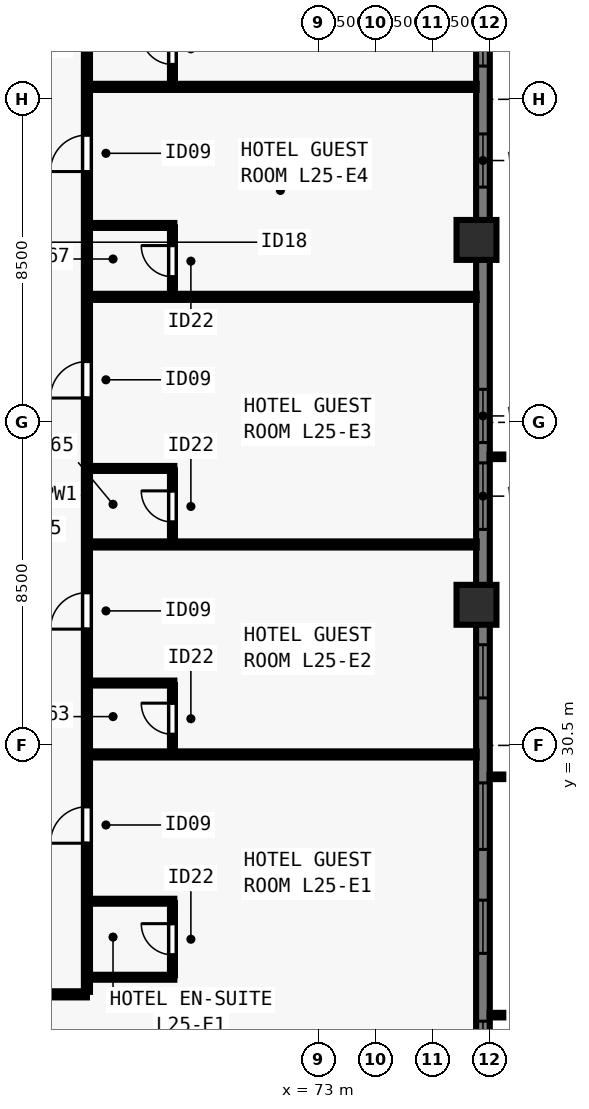
"""IFC4 building model, lengths in metres.
Left out: names, types, materials, properties, quantities, classifications, styles, units other than length and angle.
Written with IfcOpenShell. Run it as: python <this file> out.ifc"""

import sys

from ifc_helpers import new_model, si_unit, direction, frame, frame_2d, origin, origin_2d, place, context, subcontext, project, spatial, rectangle, extrude, element, fill, save


model = new_model("IFC4")
c1 = context("Model", 3, precision=1e-05, world=origin(), true_north=direction((0.0, 1.0)))
c2 = subcontext(c1, "Body", "Model", "MODEL_VIEW")
j1 = project(units=[si_unit("LENGTHUNIT", "METRE"), si_unit("PLANEANGLEUNIT", "RADIAN")], contexts=[c1])
p1 = place(None, origin())
s1 = spatial("IfcSite", under=j1, at=p1, CompositionType="ELEMENT")
p2 = place(p1, origin())
s2 = spatial("IfcBuilding", under=s1, at=p2, CompositionType="ELEMENT")
p3 = place(p2, frame((0.0, 0.0, 93.5)))
s3 = spatial("IfcBuildingStorey", under=s2, at=p3, CompositionType="ELEMENT", Elevation=93.5)
for number, where, z_axis, x_axis in (
    (1, (77.15, 34.2, 0.0), (0.0, 0.0, 1.0), (0.0, 1.0, 0.0)),
    (2, (77.15, 43.8, 0.0), (0.0, 0.0, 1.0), (0.0, 1.0, 0.0)),
):
    element("IfcColumn", number, at=place(p3, frame(where, z_axis=z_axis, x_axis=x_axis)), inside=s3, PredefinedType="COLUMN", context=c2, shape_type="SweptSolid", body=[
        extrude(rectangle(XDim=1.05, YDim=1.05, at=origin_2d()), origin(), (0.0, 0.0, 1.0), 3.5),
    ])
p4 = place(p3, frame((77.32, 61.5, 0.0), z_axis=(0.0, 0.0, 1.0), x_axis=(0.0, -1.0, 0.0)))
e3 = element("IfcWall", 3, at=p4, inside=s3, PredefinedType="SOLIDWALL", context=c2, shape_type="SweptSolid", body=[
    extrude(rectangle(XDim=44.662, YDim=0.36, at=frame_2d((22.331, 0.0))), origin(), (0.0, 0.0, 1.0), 3.24),
])
p5 = place(p4, frame((8.19, 0.0, 0.8)))
e4 = element("IfcOpeningElement", 4, at=p5, cuts=e3, PredefinedType="OPENING", context=c2, shape_type="SweptSolid", body=[
    extrude(rectangle(XDim=1.4, YDim=1.504, at=frame_2d((0.7, 0.752))), frame((0.0, 0.19, 0.0), z_axis=(0.0, -1.0, 0.0), x_axis=(1.0, 0.0, 0.0)), (0.0, 0.0, 1.0), 0.38),
])
p6 = place(p4, frame((11.375, 0.0, 0.8)))
e5 = element("IfcOpeningElement", 5, at=p6, cuts=e3, PredefinedType="OPENING", context=c2, shape_type="SweptSolid", body=[
    extrude(rectangle(XDim=1.75, YDim=1.504, at=frame_2d((0.875, 0.752))), frame((0.0, 0.19, 0.0), z_axis=(0.0, -1.0, 0.0), x_axis=(1.0, 0.0, 0.0)), (0.0, 0.0, 1.0), 0.38),
])
p7 = place(p4, frame((14.911, 0.0, 0.8)))
e6 = element("IfcOpeningElement", 6, at=p7, cuts=e3, PredefinedType="OPENING", context=c2, shape_type="SweptSolid", body=[
    extrude(rectangle(XDim=1.4, YDim=1.504, at=frame_2d((0.7, 0.752))), frame((0.0, 0.19, 0.0), z_axis=(0.0, -1.0, 0.0), x_axis=(1.0, 0.0, 0.0)), (0.0, 0.0, 1.0), 0.38),
])
p8 = place(p4, frame((21.631, 0.0, 0.8)))
e7 = element("IfcOpeningElement", 7, at=p8, cuts=e3, PredefinedType="OPENING", context=c2, shape_type="SweptSolid", body=[
    extrude(rectangle(XDim=1.4, YDim=1.504, at=frame_2d((0.7, 0.752))), frame((0.0, 0.19, 0.0), z_axis=(0.0, -1.0, 0.0), x_axis=(1.0, 0.0, 0.0)), (0.0, 0.0, 1.0), 0.38),
])
p9 = place(p4, frame((23.566, 0.0, 0.8)))
e8 = element("IfcOpeningElement", 8, at=p9, cuts=e3, PredefinedType="OPENING", context=c2, shape_type="SweptSolid", body=[
    extrude(rectangle(XDim=1.75, YDim=1.504, at=frame_2d((0.875, 0.752))), frame((0.0, 0.19, 0.0), z_axis=(0.0, -1.0, 0.0), x_axis=(1.0, 0.0, 0.0)), (0.0, 0.0, 1.0), 0.38),
])
p10 = place(p4, frame((28.351, 0.0, 0.8)))
e9 = element("IfcOpeningElement", 9, at=p10, cuts=e3, PredefinedType="OPENING", context=c2, shape_type="SweptSolid", body=[
    extrude(rectangle(XDim=1.4, YDim=1.504, at=frame_2d((0.7, 0.752))), frame((0.0, 0.19, 0.0), z_axis=(0.0, -1.0, 0.0), x_axis=(1.0, 0.0, 0.0)), (0.0, 0.0, 1.0), 0.38),
])
p11 = place(p4, frame((31.987, 0.0, 0.8)))
e10 = element("IfcOpeningElement", 10, at=p11, cuts=e3, PredefinedType="OPENING", context=c2, shape_type="SweptSolid", body=[
    extrude(rectangle(XDim=1.75, YDim=1.504, at=frame_2d((0.875, 0.752))), frame((0.0, 0.19, 0.0), z_axis=(0.0, -1.0, 0.0), x_axis=(1.0, 0.0, 0.0)), (0.0, 0.0, 1.0), 0.38),
])
p12 = place(p4, frame((35.072, 0.0, 0.8)))
e11 = element("IfcOpeningElement", 11, at=p12, cuts=e3, PredefinedType="OPENING", context=c2, shape_type="SweptSolid", body=[
    extrude(rectangle(XDim=1.4, YDim=1.504, at=frame_2d((0.7, 0.752))), frame((0.0, 0.19, 0.0), z_axis=(0.0, -1.0, 0.0), x_axis=(1.0, 0.0, 0.0)), (0.0, 0.0, 1.0), 0.38),
])
p13 = place(p4, frame((38.257, 0.0, 0.8)))
e12 = element("IfcOpeningElement", 12, at=p13, cuts=e3, PredefinedType="OPENING", context=c2, shape_type="SweptSolid", body=[
    extrude(rectangle(XDim=1.75, YDim=1.504, at=frame_2d((0.875, 0.752))), frame((0.0, 0.19, 0.0), z_axis=(0.0, -1.0, 0.0), x_axis=(1.0, 0.0, 0.0)), (0.0, 0.0, 1.0), 0.38),
])
p14 = place(p3, frame((37.1, 23.95, 0.0), z_axis=(0.0, 0.0, 1.0), x_axis=(1.0, 0.0, 0.0)))
e13 = element("IfcWall", 13, at=p14, inside=s3, PredefinedType="PARTITIONING", context=c2, shape_type="SweptSolid", body=[
    extrude(rectangle(XDim=29.8, YDim=0.16, at=frame_2d((14.9, 0.0))), origin(), (0.0, 0.0, 1.0), 3.24),
])
p15 = place(p14, frame((2.571, 0.0, 0.0)))
e14 = element("IfcOpeningElement", 14, at=p15, cuts=e13, PredefinedType="OPENING", context=c2, shape_type="SweptSolid", body=[
    extrude(rectangle(XDim=0.96, YDim=2.15, at=frame_2d((0.48, 1.075))), frame((0.0, 0.09, 0.0), z_axis=(0.0, -1.0, 0.0), x_axis=(1.0, 0.0, 0.0)), (0.0, 0.0, 1.0), 0.18),
])
p16 = place(p14, frame((15.42, 0.0, 0.0)))
e15 = element("IfcOpeningElement", 15, at=p16, cuts=e13, PredefinedType="OPENING", context=c2, shape_type="SweptSolid", body=[
    extrude(rectangle(XDim=0.96, YDim=2.15, at=frame_2d((0.48, 1.075))), frame((0.0, 0.09, 0.0), z_axis=(0.0, -1.0, 0.0), x_axis=(1.0, 0.0, 0.0)), (0.0, 0.0, 1.0), 0.18),
])
p17 = place(p14, frame((27.269, 0.0, 0.0)))
e16 = element("IfcOpeningElement", 16, at=p17, cuts=e13, PredefinedType="OPENING", context=c2, shape_type="SweptSolid", body=[
    extrude(rectangle(XDim=0.96, YDim=2.15, at=frame_2d((0.48, 1.075))), frame((0.0, 0.09, 0.0), z_axis=(0.0, -1.0, 0.0), x_axis=(1.0, 0.0, 0.0)), (0.0, 0.0, 1.0), 0.18),
])
p18 = place(p3, frame((66.9, 24.015, 0.0), z_axis=(0.0, 0.0, 1.0), x_axis=(0.0, 1.0, 0.0)))
e17 = element("IfcWall", 17, at=p18, inside=s3, PredefinedType="PARTITIONING", context=c2, shape_type="SweptSolid", body=[
    extrude(rectangle(XDim=29.97, YDim=0.16, at=frame_2d((14.985, 0.0))), origin(), (0.0, 0.0, 1.0), 3.24),
])
p19 = place(p18, frame((3.911, 0.0, 0.0)))
e18 = element("IfcOpeningElement", 18, at=p19, cuts=e17, PredefinedType="OPENING", context=c2, shape_type="SweptSolid", body=[
    extrude(rectangle(XDim=0.96, YDim=2.15, at=frame_2d((0.48, 1.075))), frame((0.0, 0.09, 0.0), z_axis=(0.0, -1.0, 0.0), x_axis=(1.0, 0.0, 0.0)), (0.0, 0.0, 1.0), 0.18),
])
p20 = place(p18, frame((9.544, 0.0, 0.0)))
e19 = element("IfcOpeningElement", 19, at=p20, cuts=e17, PredefinedType="OPENING", context=c2, shape_type="SweptSolid", body=[
    extrude(rectangle(XDim=0.96, YDim=2.15, at=frame_2d((0.48, 1.075))), frame((0.0, 0.09, 0.0), z_axis=(0.0, -1.0, 0.0), x_axis=(1.0, 0.0, 0.0)), (0.0, 0.0, 1.0), 0.18),
])
p21 = place(p18, frame((15.625, 0.0, 0.0)))
e20 = element("IfcOpeningElement", 20, at=p21, cuts=e17, PredefinedType="OPENING", context=c2, shape_type="SweptSolid", body=[
    extrude(rectangle(XDim=0.96, YDim=2.15, at=frame_2d((0.48, 1.075))), frame((0.0, 0.09, 0.0), z_axis=(0.0, -1.0, 0.0), x_axis=(1.0, 0.0, 0.0)), (0.0, 0.0, 1.0), 0.18),
])
p22 = place(p18, frame((21.584, 0.0, 0.0)))
e21 = element("IfcOpeningElement", 21, at=p22, cuts=e17, PredefinedType="OPENING", context=c2, shape_type="SweptSolid", body=[
    extrude(rectangle(XDim=0.96, YDim=2.15, at=frame_2d((0.48, 1.075))), frame((0.0, 0.09, 0.0), z_axis=(0.0, -1.0, 0.0), x_axis=(1.0, 0.0, 0.0)), (0.0, 0.0, 1.0), 0.18),
])
p23 = place(p18, frame((27.494, 0.0, 0.0)))
e22 = element("IfcOpeningElement", 22, at=p23, cuts=e17, PredefinedType="OPENING", context=c2, shape_type="SweptSolid", body=[
    extrude(rectangle(XDim=0.96, YDim=2.15, at=frame_2d((0.48, 1.075))), frame((0.0, 0.09, 0.0), z_axis=(0.0, -1.0, 0.0), x_axis=(1.0, 0.0, 0.0)), (0.0, 0.0, 1.0), 0.18),
])
p24 = place(p3, frame((66.965, 24.4, 0.0), z_axis=(0.0, 0.0, 1.0), x_axis=(1.0, 0.0, 0.0)))
e23 = element("IfcWall", 23, at=p24, inside=s3, PredefinedType="PLUMBINGWALL", context=c2, shape_type="SweptSolid", body=[
    extrude(rectangle(XDim=2.235, YDim=0.13, at=frame_2d((1.117, 0.0))), origin(), (0.0, 0.0, 1.0), 2.809),
])
p25 = place(p3, frame((66.965, 26.4, 0.0), z_axis=(0.0, 0.0, 1.0), x_axis=(1.0, 0.0, 0.0)))
e24 = element("IfcWall", 24, at=p25, inside=s3, PredefinedType="PLUMBINGWALL", context=c2, shape_type="SweptSolid", body=[
    extrude(rectangle(XDim=2.235, YDim=0.13, at=frame_2d((1.117, 0.0))), origin(), (0.0, 0.0, 1.0), 3.24),
])
p26 = place(p3, frame((69.15, 24.45, 0.0), z_axis=(0.0, 0.0, 1.0), x_axis=(0.0, 1.0, 0.0)))
e25 = element("IfcWall", 25, at=p26, inside=s3, PredefinedType="PLUMBINGWALL", context=c2, shape_type="SweptSolid", body=[
    extrude(rectangle(XDim=1.9, YDim=0.13, at=frame_2d((0.95, 0.0))), origin(), (0.0, 0.0, 1.0), 3.24),
])
p27 = place(p26, frame((0.54, 0.0, 0.0)))
e26 = element("IfcOpeningElement", 26, at=p27, cuts=e25, PredefinedType="OPENING", context=c2, shape_type="SweptSolid", body=[
    extrude(rectangle(XDim=0.82, YDim=2.1, at=frame_2d((0.41, 1.05))), frame((0.0, 0.075, 0.0), z_axis=(0.0, -1.0, 0.0), x_axis=(1.0, 0.0, 0.0)), (0.0, 0.0, 1.0), 0.15),
])
p28 = place(p3, frame((66.965, 30.262, 0.0), z_axis=(0.0, 0.0, 1.0), x_axis=(1.0, 0.0, 0.0)))
e27 = element("IfcWall", 27, at=p28, inside=s3, PredefinedType="PARTITIONING", context=c2, shape_type="SweptSolid", body=[
    extrude(rectangle(XDim=10.19, YDim=0.16, at=frame_2d((5.095, 0.0))), origin(), (0.0, 0.0, 1.0), 3.24),
])
p29 = place(p3, frame((66.965, 32.141, 0.0), z_axis=(0.0, 0.0, 1.0), x_axis=(1.0, 0.0, 0.0)))
e28 = element("IfcWall", 28, at=p29, inside=s3, PredefinedType="PLUMBINGWALL", context=c2, shape_type="SweptSolid", body=[
    extrude(rectangle(XDim=2.235, YDim=0.13, at=frame_2d((1.117, 0.0))), origin(), (0.0, 0.0, 1.0), 2.399),
])
p30 = place(p3, frame((69.15, 30.327, 0.0), z_axis=(0.0, 0.0, 1.0), x_axis=(0.0, 1.0, 0.0)))
e29 = element("IfcWall", 29, at=p30, inside=s3, PredefinedType="PLUMBINGWALL", context=c2, shape_type="SweptSolid", body=[
    extrude(rectangle(XDim=1.764, YDim=0.13, at=frame_2d((0.882, 0.0))), origin(), (0.0, 0.0, 1.0), 3.24),
])
p31 = place(p30, frame((0.464, 0.0, 0.0)))
e30 = element("IfcOpeningElement", 30, at=p31, cuts=e29, PredefinedType="OPENING", context=c2, shape_type="SweptSolid", body=[
    extrude(rectangle(XDim=0.82, YDim=2.1, at=frame_2d((0.41, 1.05))), frame((0.0, 0.075, 0.0), z_axis=(0.0, -1.0, 0.0), x_axis=(1.0, 0.0, 0.0)), (0.0, 0.0, 1.0), 0.15),
])
p32 = place(p3, frame((66.965, 35.788, 0.0), z_axis=(0.0, 0.0, 1.0), x_axis=(1.0, 0.0, 0.0)))
e31 = element("IfcWall", 31, at=p32, inside=s3, PredefinedType="PARTITIONING", context=c2, shape_type="SweptSolid", body=[
    extrude(rectangle(XDim=10.19, YDim=0.16, at=frame_2d((5.095, 0.0))), origin(), (0.0, 0.0, 1.0), 3.24),
])
p33 = place(p3, frame((66.965, 37.788, 0.0), z_axis=(0.0, 0.0, 1.0), x_axis=(1.0, 0.0, 0.0)))
e32 = element("IfcWall", 32, at=p33, inside=s3, PredefinedType="PLUMBINGWALL", context=c2, shape_type="SweptSolid", body=[
    extrude(rectangle(XDim=2.235, YDim=0.13, at=frame_2d((1.117, 0.0))), origin(), (0.0, 0.0, 1.0), 3.24),
])
p34 = place(p3, frame((69.15, 35.853, 0.0), z_axis=(0.0, 0.0, 1.0), x_axis=(0.0, 1.0, 0.0)))
e33 = element("IfcWall", 33, at=p34, inside=s3, PredefinedType="PLUMBINGWALL", context=c2, shape_type="SweptSolid", body=[
    extrude(rectangle(XDim=1.885, YDim=0.13, at=frame_2d((0.942, 0.0))), origin(), (0.0, 0.0, 1.0), 3.24),
])
p35 = place(p34, frame((0.525, 0.0, 0.0)))
e34 = element("IfcOpeningElement", 34, at=p35, cuts=e33, PredefinedType="OPENING", context=c2, shape_type="SweptSolid", body=[
    extrude(rectangle(XDim=0.82, YDim=2.1, at=frame_2d((0.41, 1.05))), frame((0.0, 0.075, 0.0), z_axis=(0.0, -1.0, 0.0), x_axis=(1.0, 0.0, 0.0)), (0.0, 0.0, 1.0), 0.15),
])
p36 = place(p3, frame((66.965, 42.302, 0.0), z_axis=(0.0, 0.0, 1.0), x_axis=(1.0, 0.0, 0.0)))
e35 = element("IfcWall", 35, at=p36, inside=s3, PredefinedType="PARTITIONING", context=c2, shape_type="SweptSolid", body=[
    extrude(rectangle(XDim=10.19, YDim=0.16, at=frame_2d((5.095, 0.0))), origin(), (0.0, 0.0, 1.0), 3.24),
])
p37 = place(p3, frame((66.965, 44.181, 0.0), z_axis=(0.0, 0.0, 1.0), x_axis=(1.0, 0.0, 0.0)))
e36 = element("IfcWall", 36, at=p37, inside=s3, PredefinedType="PLUMBINGWALL", context=c2, shape_type="SweptSolid", body=[
    extrude(rectangle(XDim=2.235, YDim=0.13, at=frame_2d((1.117, 0.0))), origin(), (0.0, 0.0, 1.0), 3.24),
])
p38 = place(p3, frame((69.15, 42.367, 0.0), z_axis=(0.0, 0.0, 1.0), x_axis=(0.0, 1.0, 0.0)))
e37 = element("IfcWall", 37, at=p38, inside=s3, PredefinedType="PLUMBINGWALL", context=c2, shape_type="SweptSolid", body=[
    extrude(rectangle(XDim=1.764, YDim=0.13, at=frame_2d((0.882, 0.0))), origin(), (0.0, 0.0, 1.0), 3.24),
])
p39 = place(p38, frame((0.464, 0.0, 0.0)))
e38 = element("IfcOpeningElement", 38, at=p39, cuts=e37, PredefinedType="OPENING", context=c2, shape_type="SweptSolid", body=[
    extrude(rectangle(XDim=0.82, YDim=2.1, at=frame_2d((0.41, 1.05))), frame((0.0, 0.075, 0.0), z_axis=(0.0, -1.0, 0.0), x_axis=(1.0, 0.0, 0.0)), (0.0, 0.0, 1.0), 0.15),
])
p40 = place(p3, frame((66.965, 47.827, 0.0), z_axis=(0.0, 0.0, 1.0), x_axis=(1.0, 0.0, 0.0)))
e39 = element("IfcWall", 39, at=p40, inside=s3, PredefinedType="PARTITIONING", context=c2, shape_type="SweptSolid", body=[
    extrude(rectangle(XDim=10.19, YDim=0.16, at=frame_2d((5.095, 0.0))), origin(), (0.0, 0.0, 1.0), 3.24),
])
p41 = place(p3, frame((69.15, 47.893, 0.0), z_axis=(0.0, 0.0, 1.0), x_axis=(0.0, 1.0, 0.0)))
e40 = element("IfcWall", 40, at=p41, inside=s3, PredefinedType="PLUMBINGWALL", context=c2, shape_type="SweptSolid", body=[
    extrude(rectangle(XDim=1.885, YDim=0.13, at=frame_2d((0.942, 0.0))), origin(), (0.0, 0.0, 1.0), 3.24),
])
p42 = place(p41, frame((0.525, 0.0, 0.0)))
e41 = element("IfcOpeningElement", 41, at=p42, cuts=e40, PredefinedType="OPENING", context=c2, shape_type="SweptSolid", body=[
    extrude(rectangle(XDim=0.82, YDim=2.1, at=frame_2d((0.41, 1.05))), frame((0.0, 0.075, 0.0), z_axis=(0.0, -1.0, 0.0), x_axis=(1.0, 0.0, 0.0)), (0.0, 0.0, 1.0), 0.15),
])
p43 = place(p6, origin())
e42 = element("IfcWindow", 42, at=p43, inside=s3, PartitioningType="SINGLE_PANEL", PredefinedType="WINDOW", context=c2, shape_type="SweptSolid", body=[
    extrude(rectangle(XDim=1.75, YDim=1.504, at=frame_2d((0.875, 0.752))), frame((0.0, -0.05, 0.0), z_axis=(0.0, -1.0, 0.0), x_axis=(1.0, 0.0, 0.0)), (0.0, 0.0, 1.0), 0.06),
])
fill(e5, e42)
p44 = place(p7, origin())
e43 = element("IfcWindow", 43, at=p44, inside=s3, PartitioningType="SINGLE_PANEL", PredefinedType="WINDOW", context=c2, shape_type="SweptSolid", body=[
    extrude(rectangle(XDim=1.4, YDim=1.504, at=frame_2d((0.7, 0.752))), frame((0.0, -0.05, 0.0), z_axis=(0.0, -1.0, 0.0), x_axis=(1.0, 0.0, 0.0)), (0.0, 0.0, 1.0), 0.06),
])
fill(e6, e43)
p45 = place(p8, origin())
e44 = element("IfcWindow", 44, at=p45, inside=s3, PartitioningType="SINGLE_PANEL", PredefinedType="WINDOW", context=c2, shape_type="SweptSolid", body=[
    extrude(rectangle(XDim=1.4, YDim=1.504, at=frame_2d((0.7, 0.752))), frame((0.0, -0.05, 0.0), z_axis=(0.0, -1.0, 0.0), x_axis=(1.0, 0.0, 0.0)), (0.0, 0.0, 1.0), 0.06),
])
fill(e7, e44)
p46 = place(p9, origin())
e45 = element("IfcWindow", 45, at=p46, inside=s3, PartitioningType="SINGLE_PANEL", PredefinedType="WINDOW", context=c2, shape_type="SweptSolid", body=[
    extrude(rectangle(XDim=1.75, YDim=1.504, at=frame_2d((0.875, 0.752))), frame((0.0, -0.05, 0.0), z_axis=(0.0, -1.0, 0.0), x_axis=(1.0, 0.0, 0.0)), (0.0, 0.0, 1.0), 0.06),
])
fill(e8, e45)
p47 = place(p10, origin())
e46 = element("IfcWindow", 46, at=p47, inside=s3, PartitioningType="SINGLE_PANEL", PredefinedType="WINDOW", context=c2, shape_type="SweptSolid", body=[
    extrude(rectangle(XDim=1.4, YDim=1.504, at=frame_2d((0.7, 0.752))), frame((0.0, -0.05, 0.0), z_axis=(0.0, -1.0, 0.0), x_axis=(1.0, 0.0, 0.0)), (0.0, 0.0, 1.0), 0.06),
])
fill(e9, e46)
p48 = place(p11, origin())
e47 = element("IfcWindow", 47, at=p48, inside=s3, PartitioningType="SINGLE_PANEL", PredefinedType="WINDOW", context=c2, shape_type="SweptSolid", body=[
    extrude(rectangle(XDim=1.75, YDim=1.504, at=frame_2d((0.875, 0.752))), frame((0.0, -0.05, 0.0), z_axis=(0.0, -1.0, 0.0), x_axis=(1.0, 0.0, 0.0)), (0.0, 0.0, 1.0), 0.06),
])
fill(e10, e47)
p49 = place(p12, origin())
e48 = element("IfcWindow", 48, at=p49, inside=s3, PartitioningType="SINGLE_PANEL", PredefinedType="WINDOW", context=c2, shape_type="SweptSolid", body=[
    extrude(rectangle(XDim=1.4, YDim=1.504, at=frame_2d((0.7, 0.752))), frame((0.0, -0.05, 0.0), z_axis=(0.0, -1.0, 0.0), x_axis=(1.0, 0.0, 0.0)), (0.0, 0.0, 1.0), 0.06),
])
fill(e11, e48)
p50 = place(p13, origin())
e49 = element("IfcWindow", 49, at=p50, inside=s3, PartitioningType="SINGLE_PANEL", PredefinedType="WINDOW", context=c2, shape_type="SweptSolid", body=[
    extrude(rectangle(XDim=1.75, YDim=1.504, at=frame_2d((0.875, 0.752))), frame((0.0, -0.05, 0.0), z_axis=(0.0, -1.0, 0.0), x_axis=(1.0, 0.0, 0.0)), (0.0, 0.0, 1.0), 0.06),
])
fill(e12, e49)
p51 = place(p27, origin())
e50 = element("IfcDoor", 50, at=p51, inside=s3, OperationType="SINGLE_SWING_RIGHT", PredefinedType="DOOR", context=c2, shape_type="SweptSolid", body=[
    extrude(rectangle(XDim=0.82, YDim=2.1, at=frame_2d((0.41, 1.05))), frame((0.0, 0.025, 0.0), z_axis=(0.0, -1.0, 0.0), x_axis=(1.0, 0.0, 0.0)), (0.0, 0.0, 1.0), 0.05),
])
fill(e26, e50)
p52 = place(p19, origin())
e51 = element("IfcDoor", 51, at=p52, inside=s3, OperationType="SINGLE_SWING_LEFT", PredefinedType="DOOR", context=c2, shape_type="SweptSolid", body=[
    extrude(rectangle(XDim=0.96, YDim=2.15, at=frame_2d((0.48, 1.075))), frame((0.0, 0.025, 0.0), z_axis=(0.0, -1.0, 0.0), x_axis=(1.0, 0.0, 0.0)), (0.0, 0.0, 1.0), 0.05),
])
fill(e18, e51)
p53 = place(p31, origin())
e52 = element("IfcDoor", 52, at=p53, inside=s3, OperationType="SINGLE_SWING_RIGHT", PredefinedType="DOOR", context=c2, shape_type="SweptSolid", body=[
    extrude(rectangle(XDim=0.82, YDim=2.1, at=frame_2d((0.41, 1.05))), frame((0.0, 0.025, 0.0), z_axis=(0.0, -1.0, 0.0), x_axis=(1.0, 0.0, 0.0)), (0.0, 0.0, 1.0), 0.05),
])
fill(e30, e52)
p54 = place(p20, origin())
e53 = element("IfcDoor", 53, at=p54, inside=s3, OperationType="SINGLE_SWING_LEFT", PredefinedType="DOOR", context=c2, shape_type="SweptSolid", body=[
    extrude(rectangle(XDim=0.96, YDim=2.15, at=frame_2d((0.48, 1.075))), frame((0.0, 0.025, 0.0), z_axis=(0.0, -1.0, 0.0), x_axis=(1.0, 0.0, 0.0)), (0.0, 0.0, 1.0), 0.05),
])
fill(e19, e53)
p55 = place(p35, origin())
e54 = element("IfcDoor", 54, at=p55, inside=s3, OperationType="SINGLE_SWING_RIGHT", PredefinedType="DOOR", context=c2, shape_type="SweptSolid", body=[
    extrude(rectangle(XDim=0.82, YDim=2.1, at=frame_2d((0.41, 1.05))), frame((0.0, 0.025, 0.0), z_axis=(0.0, -1.0, 0.0), x_axis=(1.0, 0.0, 0.0)), (0.0, 0.0, 1.0), 0.05),
])
fill(e34, e54)
p56 = place(p21, origin())
e55 = element("IfcDoor", 55, at=p56, inside=s3, OperationType="SINGLE_SWING_LEFT", PredefinedType="DOOR", context=c2, shape_type="SweptSolid", body=[
    extrude(rectangle(XDim=0.96, YDim=2.15, at=frame_2d((0.48, 1.075))), frame((0.0, 0.025, 0.0), z_axis=(0.0, -1.0, 0.0), x_axis=(1.0, 0.0, 0.0)), (0.0, 0.0, 1.0), 0.05),
])
fill(e20, e55)
p57 = place(p39, origin())
e56 = element("IfcDoor", 56, at=p57, inside=s3, OperationType="SINGLE_SWING_RIGHT", PredefinedType="DOOR", context=c2, shape_type="SweptSolid", body=[
    extrude(rectangle(XDim=0.82, YDim=2.1, at=frame_2d((0.41, 1.05))), frame((0.0, 0.025, 0.0), z_axis=(0.0, -1.0, 0.0), x_axis=(1.0, 0.0, 0.0)), (0.0, 0.0, 1.0), 0.05),
])
fill(e38, e56)
p58 = place(p22, origin())
e57 = element("IfcDoor", 57, at=p58, inside=s3, OperationType="SINGLE_SWING_LEFT", PredefinedType="DOOR", context=c2, shape_type="SweptSolid", body=[
    extrude(rectangle(XDim=0.96, YDim=2.15, at=frame_2d((0.48, 1.075))), frame((0.0, 0.025, 0.0), z_axis=(0.0, -1.0, 0.0), x_axis=(1.0, 0.0, 0.0)), (0.0, 0.0, 1.0), 0.05),
])
fill(e21, e57)
p59 = place(p42, origin())
e58 = element("IfcDoor", 58, at=p59, inside=s3, OperationType="SINGLE_SWING_RIGHT", PredefinedType="DOOR", context=c2, shape_type="SweptSolid", body=[
    extrude(rectangle(XDim=0.82, YDim=2.1, at=frame_2d((0.41, 1.05))), frame((0.0, 0.025, 0.0), z_axis=(0.0, -1.0, 0.0), x_axis=(1.0, 0.0, 0.0)), (0.0, 0.0, 1.0), 0.05),
])
fill(e41, e58)
save(model, sys.argv[1])
